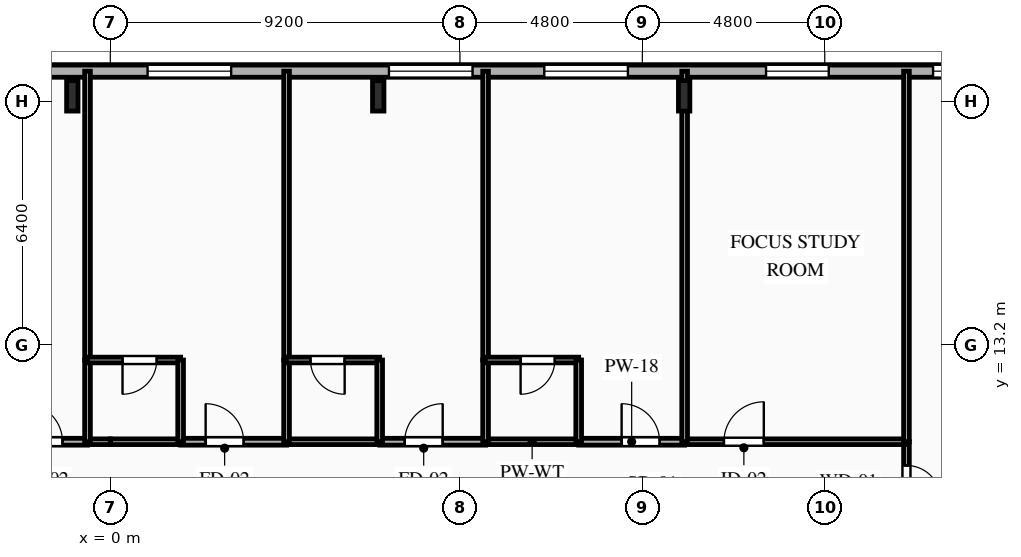
"""IFC4 building model, lengths in metres.
Left out: names, types, materials, properties, quantities, classifications, styles, units other than length and angle.
Written with IfcOpenShell. Run it as: python <this file> out.ifc"""

import sys

from ifc_helpers import new_model, si_unit, direction, frame, frame_2d, origin, origin_2d, place, context, subcontext, project, spatial, rectangle, i_section, extrude, element, fill, save


model = new_model("IFC4")
c1 = context("Model", 3, precision=1e-05, world=origin(), true_north=direction((0.0, 1.0)))
c2 = subcontext(c1, "Body", "Model", "MODEL_VIEW")
j1 = project(units=[si_unit("LENGTHUNIT", "METRE"), si_unit("PLANEANGLEUNIT", "RADIAN")], contexts=[c1])
p1 = place(None, origin())
s1 = spatial("IfcSite", under=j1, at=p1, CompositionType="ELEMENT")
p2 = place(p1, origin())
s2 = spatial("IfcBuilding", under=s1, at=p2, CompositionType="ELEMENT")
p3 = place(p2, frame((0.0, 0.0, 144.4)))
s3 = spatial("IfcBuildingStorey", under=s2, at=p3, CompositionType="ELEMENT", Elevation=144.4)
for number, where, z_axis, x_axis in (
    (1, (15.1, 19.75, 0.0), (0.0, 0.0, 1.0), (1.0, 0.0, 0.0)),
    (2, (7.05, 19.75, 0.0), (0.0, 0.0, 1.0), (1.0, 0.0, 0.0)),
    (3, (-1.0, 19.75, 0.0), (0.0, 0.0, 1.0), (1.0, 0.0, 0.0)),
):
    element("IfcColumn", number, at=place(p3, frame(where, z_axis=z_axis, x_axis=x_axis)), inside=s3, PredefinedType="COLUMN", context=c2, shape_type="SweptSolid", body=[
        extrude(i_section(OverallWidth=0.3, OverallDepth=0.8, WebThickness=0.018, FlangeThickness=0.033, FilletRadius=0.03, at=origin_2d()), origin(), (0.0, 0.0, 1.0), 3.35),
    ])
p4 = place(p3, frame((-25.8, 20.4, 0.0), z_axis=(0.0, 0.0, 1.0), x_axis=(1.0, 0.0, 0.0)))
e4 = element("IfcWall", 4, at=p4, inside=s3, PredefinedType="SOLIDWALL", context=c2, shape_type="SweptSolid", body=[
    extrude(rectangle(XDim=49.6, YDim=0.32, at=frame_2d((24.8, 0.0))), origin(), (0.0, 0.0, 1.0), 3.04),
])
p5 = place(p4, frame((2.135, 0.0, 0.85)))
e5 = element("IfcOpeningElement", 5, at=p5, cuts=e4, PredefinedType="OPENING", context=c2, shape_type="SweptSolid", body=[
    extrude(rectangle(XDim=1.65, YDim=1.85, at=frame_2d((0.825, 0.925))), frame((0.0, 0.17, 0.0), z_axis=(0.0, -1.0, 0.0), x_axis=(1.0, 0.0, 0.0)), (0.0, 0.0, 1.0), 0.34),
])
p6 = place(p4, frame((6.375, 0.0, 0.85)))
e6 = element("IfcOpeningElement", 6, at=p6, cuts=e4, PredefinedType="OPENING", context=c2, shape_type="SweptSolid", body=[
    extrude(rectangle(XDim=1.65, YDim=1.85, at=frame_2d((0.825, 0.925))), frame((0.0, 0.17, 0.0), z_axis=(0.0, -1.0, 0.0), x_axis=(1.0, 0.0, 0.0)), (0.0, 0.0, 1.0), 0.34),
])
p7 = place(p4, frame((12.53, 0.0, 0.85)))
e7 = element("IfcOpeningElement", 7, at=p7, cuts=e4, PredefinedType="OPENING", context=c2, shape_type="SweptSolid", body=[
    extrude(rectangle(XDim=1.5, YDim=1.85, at=frame_2d((0.75, 0.925))), frame((0.0, 0.17, 0.0), z_axis=(0.0, -1.0, 0.0), x_axis=(1.0, 0.0, 0.0)), (0.0, 0.0, 1.0), 0.34),
])
p8 = place(p4, frame((16.94, 0.0, 0.85)))
e8 = element("IfcOpeningElement", 8, at=p8, cuts=e4, PredefinedType="OPENING", context=c2, shape_type="SweptSolid", body=[
    extrude(rectangle(XDim=2.2, YDim=1.85, at=frame_2d((1.1, 0.925))), frame((0.0, 0.17, 0.0), z_axis=(0.0, -1.0, 0.0), x_axis=(1.0, 0.0, 0.0)), (0.0, 0.0, 1.0), 0.34),
])
p9 = place(p4, frame((21.54, 0.0, 0.85)))
e9 = element("IfcOpeningElement", 9, at=p9, cuts=e4, PredefinedType="OPENING", context=c2, shape_type="SweptSolid", body=[
    extrude(rectangle(XDim=2.2, YDim=1.85, at=frame_2d((1.1, 0.925))), frame((0.0, 0.17, 0.0), z_axis=(0.0, -1.0, 0.0), x_axis=(1.0, 0.0, 0.0)), (0.0, 0.0, 1.0), 0.34),
])
p10 = place(p4, frame((26.78, 0.0, 0.85)))
e10 = element("IfcOpeningElement", 10, at=p10, cuts=e4, PredefinedType="OPENING", context=c2, shape_type="SweptSolid", body=[
    extrude(rectangle(XDim=2.2, YDim=1.85, at=frame_2d((1.1, 0.925))), frame((0.0, 0.17, 0.0), z_axis=(0.0, -1.0, 0.0), x_axis=(1.0, 0.0, 0.0)), (0.0, 0.0, 1.0), 0.34),
])
p11 = place(p4, frame((33.132, 0.0, 0.85)))
e11 = element("IfcOpeningElement", 11, at=p11, cuts=e4, PredefinedType="OPENING", context=c2, shape_type="SweptSolid", body=[
    extrude(rectangle(XDim=2.2, YDim=1.85, at=frame_2d((1.1, 0.925))), frame((0.0, 0.17, 0.0), z_axis=(0.0, -1.0, 0.0), x_axis=(1.0, 0.0, 0.0)), (0.0, 0.0, 1.0), 0.34),
])
p12 = place(p4, frame((37.22, 0.0, 0.85)))
e12 = element("IfcOpeningElement", 12, at=p12, cuts=e4, PredefinedType="OPENING", context=c2, shape_type="SweptSolid", body=[
    extrude(rectangle(XDim=2.2, YDim=1.85, at=frame_2d((1.1, 0.925))), frame((0.0, 0.17, 0.0), z_axis=(0.0, -1.0, 0.0), x_axis=(1.0, 0.0, 0.0)), (0.0, 0.0, 1.0), 0.34),
])
p13 = place(p4, frame((43.055, 0.0, 0.85)))
e13 = element("IfcOpeningElement", 13, at=p13, cuts=e4, PredefinedType="OPENING", context=c2, shape_type="SweptSolid", body=[
    extrude(rectangle(XDim=1.65, YDim=1.85, at=frame_2d((0.825, 0.925))), frame((0.0, 0.17, 0.0), z_axis=(0.0, -1.0, 0.0), x_axis=(1.0, 0.0, 0.0)), (0.0, 0.0, 1.0), 0.34),
])
p14 = place(p4, frame((47.45, 0.0, 0.85)))
e14 = element("IfcOpeningElement", 14, at=p14, cuts=e4, PredefinedType="OPENING", context=c2, shape_type="SweptSolid", body=[
    extrude(rectangle(XDim=1.1, YDim=1.85, at=frame_2d((0.55, 0.925))), frame((0.0, 0.17, 0.0), z_axis=(0.0, -1.0, 0.0), x_axis=(1.0, 0.0, 0.0)), (0.0, 0.0, 1.0), 0.34),
])
p15 = place(p3, frame((-3.388, 10.65, 0.0), z_axis=(0.0, 0.0, 1.0), x_axis=(1.0, 0.0, 0.0)))
e15 = element("IfcWall", 15, at=p15, inside=s3, PredefinedType="PARTITIONING", context=c2, shape_type="SweptSolid", body=[
    extrude(rectangle(XDim=2.788, YDim=0.18, at=frame_2d((1.394, 0.0))), origin(), (0.0, 0.0, 1.0), 3.04),
])
p16 = place(p15, frame((1.129, 0.0, 0.0)))
e16 = element("IfcOpeningElement", 16, at=p16, cuts=e15, PredefinedType="OPENING", context=c2, shape_type="SweptSolid", body=[
    extrude(rectangle(XDim=1.0, YDim=2.15, at=frame_2d((0.5, 1.075))), frame((0.0, 0.1, 0.0), z_axis=(0.0, -1.0, 0.0), x_axis=(1.0, 0.0, 0.0)), (0.0, 0.0, 1.0), 0.2),
])
p17 = place(p3, frame((-0.6, 10.65, 0.0), z_axis=(0.0, 0.0, 1.0), x_axis=(1.0, 0.0, 0.0)))
e17 = element("IfcWall", 17, at=p17, inside=s3, PredefinedType="PLUMBINGWALL", context=c2, shape_type="SweptSolid", body=[
    extrude(rectangle(XDim=0.6, YDim=0.15, at=frame_2d((0.3, 0.0))), origin(), (0.0, 0.0, 1.0), 3.04),
])
p18 = place(p3, frame((20.95, 10.65, 0.0), z_axis=(0.0, 0.0, 1.0), x_axis=(0.0, -1.0, 0.0)))
e18 = element("IfcWall", 18, at=p18, inside=s3, PredefinedType="PARTITIONING", context=c2, shape_type="SweptSolid", body=[
    extrude(rectangle(XDim=2.15, YDim=0.15, at=frame_2d((1.075, 0.0))), origin(), (0.0, 0.0, 1.0), 3.04),
])
p19 = place(p18, frame((0.625, 0.0, 0.0)))
e19 = element("IfcOpeningElement", 19, at=p19, cuts=e18, PredefinedType="OPENING", context=c2, shape_type="SweptSolid", body=[
    extrude(rectangle(XDim=0.9, YDim=2.1, at=frame_2d((0.45, 1.05))), frame((0.0, 0.085, 0.0), z_axis=(0.0, -1.0, 0.0), x_axis=(1.0, 0.0, 0.0)), (0.0, 0.0, 1.0), 0.17),
])
p20 = place(p3, frame((1.85, 10.65, 0.0), z_axis=(0.0, 0.0, 1.0), x_axis=(1.0, 0.0, 0.0)))
e20 = element("IfcWall", 20, at=p20, inside=s3, PredefinedType="PARTITIONING", context=c2, shape_type="SweptSolid", body=[
    extrude(rectangle(XDim=2.788, YDim=0.18, at=frame_2d((1.394, 0.0))), origin(), (0.0, 0.0, 1.0), 3.04),
])
p21 = place(p20, frame((0.658, 0.0, 0.0)))
e21 = element("IfcOpeningElement", 21, at=p21, cuts=e20, PredefinedType="OPENING", context=c2, shape_type="SweptSolid", body=[
    extrude(rectangle(XDim=1.0, YDim=2.15, at=frame_2d((0.5, 1.075))), frame((0.0, 0.1, 0.0), z_axis=(0.0, -1.0, 0.0), x_axis=(1.0, 0.0, 0.0)), (0.0, 0.0, 1.0), 0.2),
])
p22 = place(p3, frame((0.0, 10.65, 0.0), z_axis=(0.0, 0.0, 1.0), x_axis=(1.0, 0.0, 0.0)))
e22 = element("IfcWall", 22, at=p22, inside=s3, PredefinedType="PLUMBINGWALL", context=c2, shape_type="SweptSolid", body=[
    extrude(rectangle(XDim=1.85, YDim=0.15, at=frame_2d((0.925, 0.0))), origin(), (0.0, 0.0, 1.0), 3.04),
])
p23 = place(p3, frame((7.088, 10.65, 0.0), z_axis=(0.0, 0.0, 1.0), x_axis=(1.0, 0.0, 0.0)))
e23 = element("IfcWall", 23, at=p23, inside=s3, PredefinedType="PARTITIONING", context=c2, shape_type="SweptSolid", body=[
    extrude(rectangle(XDim=2.787, YDim=0.18, at=frame_2d((1.394, 0.0))), origin(), (0.0, 0.0, 1.0), 3.04),
])
p24 = place(p23, frame((0.658, 0.0, 0.0)))
e24 = element("IfcOpeningElement", 24, at=p24, cuts=e23, PredefinedType="OPENING", context=c2, shape_type="SweptSolid", body=[
    extrude(rectangle(XDim=1.0, YDim=2.15, at=frame_2d((0.5, 1.075))), frame((0.0, 0.1, 0.0), z_axis=(0.0, -1.0, 0.0), x_axis=(1.0, 0.0, 0.0)), (0.0, 0.0, 1.0), 0.2),
])
p25 = place(p3, frame((4.638, 10.65, 0.0), z_axis=(0.0, 0.0, 1.0), x_axis=(1.0, 0.0, 0.0)))
e25 = element("IfcWall", 25, at=p25, inside=s3, PredefinedType="PLUMBINGWALL", context=c2, shape_type="SweptSolid", body=[
    extrude(rectangle(XDim=2.45, YDim=0.15, at=frame_2d((1.225, 0.0))), origin(), (0.0, 0.0, 1.0), 3.04),
])
p26 = place(p3, frame((12.325, 10.65, 0.0), z_axis=(0.0, 0.0, 1.0), x_axis=(1.0, 0.0, 0.0)))
e26 = element("IfcWall", 26, at=p26, inside=s3, PredefinedType="PARTITIONING", context=c2, shape_type="SweptSolid", body=[
    extrude(rectangle(XDim=2.788, YDim=0.18, at=frame_2d((1.394, 0.0))), origin(), (0.0, 0.0, 1.0), 3.04),
])
p27 = place(p26, frame((1.129, 0.0, 0.0)))
e27 = element("IfcOpeningElement", 27, at=p27, cuts=e26, PredefinedType="OPENING", context=c2, shape_type="SweptSolid", body=[
    extrude(rectangle(XDim=1.0, YDim=2.15, at=frame_2d((0.5, 1.075))), frame((0.0, 0.1, 0.0), z_axis=(0.0, -1.0, 0.0), x_axis=(1.0, 0.0, 0.0)), (0.0, 0.0, 1.0), 0.2),
])
p28 = place(p3, frame((9.875, 10.65, 0.0), z_axis=(0.0, 0.0, 1.0), x_axis=(1.0, 0.0, 0.0)))
e28 = element("IfcWall", 28, at=p28, inside=s3, PredefinedType="PLUMBINGWALL", context=c2, shape_type="SweptSolid", body=[
    extrude(rectangle(XDim=2.45, YDim=0.15, at=frame_2d((1.225, 0.0))), origin(), (0.0, 0.0, 1.0), 3.04),
])
p29 = place(p3, frame((15.113, 10.65, 0.0), z_axis=(0.0, 0.0, 1.0), x_axis=(1.0, 0.0, 0.0)))
e29 = element("IfcWall", 29, at=p29, inside=s3, PredefinedType="PARTITIONING", context=c2, shape_type="SweptSolid", body=[
    extrude(rectangle(XDim=5.837, YDim=0.15, at=frame_2d((2.918, 0.0))), origin(), (0.0, 0.0, 1.0), 3.04),
])
p30 = place(p29, frame((1.033, 0.0, 0.0)))
e30 = element("IfcOpeningElement", 30, at=p30, cuts=e29, PredefinedType="OPENING", context=c2, shape_type="SweptSolid", body=[
    extrude(rectangle(XDim=1.05, YDim=2.15, at=frame_2d((0.525, 1.075))), frame((0.0, 0.085, 0.0), z_axis=(0.0, -1.0, 0.0), x_axis=(1.0, 0.0, 0.0)), (0.0, 0.0, 1.0), 0.17),
])
p31 = place(p3, frame((20.95, 10.65, 0.0), z_axis=(0.0, 0.0, 1.0), x_axis=(0.0, 1.0, 0.0)))
e31 = element("IfcWall", 31, at=p31, inside=s3, PredefinedType="PARTITIONING", context=c2, shape_type="SweptSolid", body=[
    extrude(rectangle(XDim=9.75, YDim=0.15, at=frame_2d((4.875, 0.0))), origin(), (0.0, 0.0, 1.0), 2.525),
])
p32 = place(p3, frame((-0.6, 20.4, 0.0), z_axis=(0.0, 0.0, 1.0), x_axis=(0.0, -1.0, 0.0)))
e32 = element("IfcWall", 32, at=p32, inside=s3, PredefinedType="PARTITIONING", context=c2, shape_type="SweptSolid", body=[
    extrude(rectangle(XDim=7.6, YDim=0.15, at=frame_2d((3.8, 0.0))), origin(), (0.0, 0.0, 1.0), 3.04),
])
p33 = place(p3, frame((-0.6, 12.8, 0.0), z_axis=(0.0, 0.0, 1.0), x_axis=(0.0, -1.0, 0.0)))
e33 = element("IfcWall", 33, at=p33, inside=s3, PredefinedType="PLUMBINGWALL", context=c2, shape_type="SweptSolid", body=[
    extrude(rectangle(XDim=2.15, YDim=0.15, at=frame_2d((1.075, 0.0))), origin(), (0.0, 0.0, 1.0), 3.04),
])
p34 = place(p3, frame((1.85, 12.8, 0.0), z_axis=(0.0, 0.0, 1.0), x_axis=(-1.0, 0.0, 0.0)))
e34 = element("IfcWall", 34, at=p34, inside=s3, PredefinedType="PLUMBINGWALL", context=c2, shape_type="SweptSolid", body=[
    extrude(rectangle(XDim=2.45, YDim=0.15, at=frame_2d((1.225, 0.0))), origin(), (0.0, 0.0, 1.0), 3.04),
])
p35 = place(p34, frame((0.629, 0.0, 0.0)))
e35 = element("IfcOpeningElement", 35, at=p35, cuts=e34, PredefinedType="OPENING", context=c2, shape_type="SweptSolid", body=[
    extrude(rectangle(XDim=0.9, YDim=2.1, at=frame_2d((0.45, 1.05))), frame((0.0, 0.085, 0.0), z_axis=(0.0, -1.0, 0.0), x_axis=(1.0, 0.0, 0.0)), (0.0, 0.0, 1.0), 0.17),
])
p36 = place(p3, frame((1.85, 10.65, 0.0), z_axis=(0.0, 0.0, 1.0), x_axis=(0.0, 1.0, 0.0)))
e36 = element("IfcWall", 36, at=p36, inside=s3, PredefinedType="PLUMBINGWALL", context=c2, shape_type="SweptSolid", body=[
    extrude(rectangle(XDim=2.15, YDim=0.15, at=frame_2d((1.075, 0.0))), origin(), (0.0, 0.0, 1.0), 3.04),
])
p37 = place(p3, frame((4.638, 20.4, 0.0), z_axis=(0.0, 0.0, 1.0), x_axis=(0.0, -1.0, 0.0)))
e37 = element("IfcWall", 37, at=p37, inside=s3, PredefinedType="PARTITIONING", context=c2, shape_type="SweptSolid", body=[
    extrude(rectangle(XDim=7.6, YDim=0.15, at=frame_2d((3.8, 0.0))), origin(), (0.0, 0.0, 1.0), 3.04),
])
p38 = place(p3, frame((4.638, 12.8, 0.0), z_axis=(0.0, 0.0, 1.0), x_axis=(0.0, -1.0, 0.0)))
e38 = element("IfcWall", 38, at=p38, inside=s3, PredefinedType="PLUMBINGWALL", context=c2, shape_type="SweptSolid", body=[
    extrude(rectangle(XDim=2.15, YDim=0.15, at=frame_2d((1.075, 0.0))), origin(), (0.0, 0.0, 1.0), 3.04),
])
p39 = place(p3, frame((7.088, 12.8, 0.0), z_axis=(0.0, 0.0, 1.0), x_axis=(-1.0, 0.0, 0.0)))
e39 = element("IfcWall", 39, at=p39, inside=s3, PredefinedType="PLUMBINGWALL", context=c2, shape_type="SweptSolid", body=[
    extrude(rectangle(XDim=2.45, YDim=0.15, at=frame_2d((1.225, 0.0))), origin(), (0.0, 0.0, 1.0), 3.04),
])
p40 = place(p39, frame((0.921, 0.0, 0.0)))
e40 = element("IfcOpeningElement", 40, at=p40, cuts=e39, PredefinedType="OPENING", context=c2, shape_type="SweptSolid", body=[
    extrude(rectangle(XDim=0.9, YDim=2.1, at=frame_2d((0.45, 1.05))), frame((0.0, 0.085, 0.0), z_axis=(0.0, -1.0, 0.0), x_axis=(1.0, 0.0, 0.0)), (0.0, 0.0, 1.0), 0.17),
])
p41 = place(p3, frame((7.088, 10.65, 0.0), z_axis=(0.0, 0.0, 1.0), x_axis=(0.0, 1.0, 0.0)))
e41 = element("IfcWall", 41, at=p41, inside=s3, PredefinedType="PLUMBINGWALL", context=c2, shape_type="SweptSolid", body=[
    extrude(rectangle(XDim=2.15, YDim=0.15, at=frame_2d((1.075, 0.0))), origin(), (0.0, 0.0, 1.0), 3.04),
])
p42 = place(p3, frame((9.875, 20.4, 0.0), z_axis=(0.0, 0.0, 1.0), x_axis=(0.0, -1.0, 0.0)))
e42 = element("IfcWall", 42, at=p42, inside=s3, PredefinedType="PARTITIONING", context=c2, shape_type="SweptSolid", body=[
    extrude(rectangle(XDim=7.6, YDim=0.15, at=frame_2d((3.8, 0.0))), origin(), (0.0, 0.0, 1.0), 3.04),
])
p43 = place(p3, frame((9.875, 12.8, 0.0), z_axis=(0.0, 0.0, 1.0), x_axis=(0.0, -1.0, 0.0)))
e43 = element("IfcWall", 43, at=p43, inside=s3, PredefinedType="PLUMBINGWALL", context=c2, shape_type="SweptSolid", body=[
    extrude(rectangle(XDim=2.15, YDim=0.15, at=frame_2d((1.075, 0.0))), origin(), (0.0, 0.0, 1.0), 3.04),
])
p44 = place(p3, frame((12.325, 12.8, 0.0), z_axis=(0.0, 0.0, 1.0), x_axis=(-1.0, 0.0, 0.0)))
e44 = element("IfcWall", 44, at=p44, inside=s3, PredefinedType="PLUMBINGWALL", context=c2, shape_type="SweptSolid", body=[
    extrude(rectangle(XDim=2.45, YDim=0.15, at=frame_2d((1.225, 0.0))), origin(), (0.0, 0.0, 1.0), 3.04),
])
p45 = place(p44, frame((0.629, 0.0, 0.0)))
e45 = element("IfcOpeningElement", 45, at=p45, cuts=e44, PredefinedType="OPENING", context=c2, shape_type="SweptSolid", body=[
    extrude(rectangle(XDim=0.9, YDim=2.1, at=frame_2d((0.45, 1.05))), frame((0.0, 0.085, 0.0), z_axis=(0.0, -1.0, 0.0), x_axis=(1.0, 0.0, 0.0)), (0.0, 0.0, 1.0), 0.17),
])
p46 = place(p3, frame((12.325, 10.65, 0.0), z_axis=(0.0, 0.0, 1.0), x_axis=(0.0, 1.0, 0.0)))
e46 = element("IfcWall", 46, at=p46, inside=s3, PredefinedType="PLUMBINGWALL", context=c2, shape_type="SweptSolid", body=[
    extrude(rectangle(XDim=2.15, YDim=0.15, at=frame_2d((1.075, 0.0))), origin(), (0.0, 0.0, 1.0), 3.04),
])
p47 = place(p3, frame((15.113, 20.4, 0.0), z_axis=(0.0, 0.0, 1.0), x_axis=(0.0, -1.0, 0.0)))
e47 = element("IfcWall", 47, at=p47, inside=s3, PredefinedType="PARTITIONING", context=c2, shape_type="SweptSolid", body=[
    extrude(rectangle(XDim=9.75, YDim=0.15, at=frame_2d((4.875, 0.0))), origin(), (0.0, 0.0, 1.0), 2.525),
])
p48 = place(p10, origin())
e48 = element("IfcWindow", 48, at=p48, inside=s3, PartitioningType="SINGLE_PANEL", PredefinedType="WINDOW", context=c2, shape_type="SweptSolid", body=[
    extrude(rectangle(XDim=2.2, YDim=1.85, at=frame_2d((1.1, 0.925))), frame((0.0, 0.03, 0.0), z_axis=(0.0, -1.0, 0.0), x_axis=(1.0, 0.0, 0.0)), (0.0, 0.0, 1.0), 0.06),
])
fill(e10, e48)
p49 = place(p11, origin())
e49 = element("IfcWindow", 49, at=p49, inside=s3, PartitioningType="SINGLE_PANEL", PredefinedType="WINDOW", context=c2, shape_type="SweptSolid", body=[
    extrude(rectangle(XDim=2.2, YDim=1.85, at=frame_2d((1.1, 0.925))), frame((0.0, 0.03, 0.0), z_axis=(0.0, -1.0, 0.0), x_axis=(1.0, 0.0, 0.0)), (0.0, 0.0, 1.0), 0.06),
])
fill(e11, e49)
p50 = place(p12, origin())
e50 = element("IfcWindow", 50, at=p50, inside=s3, PartitioningType="SINGLE_PANEL", PredefinedType="WINDOW", context=c2, shape_type="SweptSolid", body=[
    extrude(rectangle(XDim=2.2, YDim=1.85, at=frame_2d((1.1, 0.925))), frame((0.0, 0.03, 0.0), z_axis=(0.0, -1.0, 0.0), x_axis=(1.0, 0.0, 0.0)), (0.0, 0.0, 1.0), 0.06),
])
fill(e12, e50)
p51 = place(p13, origin())
e51 = element("IfcWindow", 51, at=p51, inside=s3, PartitioningType="SINGLE_PANEL", PredefinedType="WINDOW", context=c2, shape_type="SweptSolid", body=[
    extrude(rectangle(XDim=1.65, YDim=1.85, at=frame_2d((0.825, 0.925))), frame((0.0, 0.03, 0.0), z_axis=(0.0, -1.0, 0.0), x_axis=(1.0, 0.0, 0.0)), (0.0, 0.0, 1.0), 0.06),
])
fill(e13, e51)
p52 = place(p14, origin())
e52 = element("IfcWindow", 52, at=p52, inside=s3, PartitioningType="SINGLE_PANEL", PredefinedType="WINDOW", context=c2, shape_type="SweptSolid", body=[
    extrude(rectangle(XDim=1.1, YDim=1.85, at=frame_2d((0.55, 0.925))), frame((0.0, 0.03, 0.0), z_axis=(0.0, -1.0, 0.0), x_axis=(1.0, 0.0, 0.0)), (0.0, 0.0, 1.0), 0.06),
])
fill(e14, e52)
p53 = place(p16, origin())
e53 = element("IfcDoor", 53, at=p53, inside=s3, OperationType="SINGLE_SWING_LEFT", PredefinedType="DOOR", context=c2, shape_type="SweptSolid", body=[
    extrude(rectangle(XDim=1.0, YDim=2.15, at=frame_2d((0.5, 1.075))), frame((0.0, 0.025, 0.0), z_axis=(0.0, -1.0, 0.0), x_axis=(1.0, 0.0, 0.0)), (0.0, 0.0, 1.0), 0.05),
])
fill(e16, e53)
p54 = place(p19, origin())
e54 = element("IfcDoor", 54, at=p54, inside=s3, OperationType="SINGLE_SWING_RIGHT", PredefinedType="DOOR", context=c2, shape_type="SweptSolid", body=[
    extrude(rectangle(XDim=0.9, YDim=2.1, at=frame_2d((0.45, 1.05))), frame((0.0, 0.025, 0.0), z_axis=(0.0, -1.0, 0.0), x_axis=(1.0, 0.0, 0.0)), (0.0, 0.0, 1.0), 0.05),
])
fill(e19, e54)
p55 = place(p21, origin())
e55 = element("IfcDoor", 55, at=p55, inside=s3, OperationType="SINGLE_SWING_LEFT", PredefinedType="DOOR", context=c2, shape_type="SweptSolid", body=[
    extrude(rectangle(XDim=1.0, YDim=2.15, at=frame_2d((0.5, 1.075))), frame((0.0, 0.025, 0.0), z_axis=(0.0, -1.0, 0.0), x_axis=(1.0, 0.0, 0.0)), (0.0, 0.0, 1.0), 0.05),
])
fill(e21, e55)
p56 = place(p24, origin())
e56 = element("IfcDoor", 56, at=p56, inside=s3, OperationType="SINGLE_SWING_RIGHT", PredefinedType="DOOR", context=c2, shape_type="SweptSolid", body=[
    extrude(rectangle(XDim=1.0, YDim=2.15, at=frame_2d((0.5, 1.075))), frame((0.0, 0.025, 0.0), z_axis=(0.0, -1.0, 0.0), x_axis=(1.0, 0.0, 0.0)), (0.0, 0.0, 1.0), 0.05),
])
fill(e24, e56)
p57 = place(p27, origin())
e57 = element("IfcDoor", 57, at=p57, inside=s3, OperationType="SINGLE_SWING_LEFT", PredefinedType="DOOR", context=c2, shape_type="SweptSolid", body=[
    extrude(rectangle(XDim=1.0, YDim=2.15, at=frame_2d((0.5, 1.075))), frame((0.0, 0.025, 0.0), z_axis=(0.0, -1.0, 0.0), x_axis=(1.0, 0.0, 0.0)), (0.0, 0.0, 1.0), 0.05),
])
fill(e27, e57)
p58 = place(p30, origin())
e58 = element("IfcDoor", 58, at=p58, inside=s3, OperationType="SINGLE_SWING_RIGHT", PredefinedType="DOOR", context=c2, shape_type="SweptSolid", body=[
    extrude(rectangle(XDim=1.05, YDim=2.15, at=frame_2d((0.525, 1.075))), frame((0.0, 0.025, 0.0), z_axis=(0.0, -1.0, 0.0), x_axis=(1.0, 0.0, 0.0)), (0.0, 0.0, 1.0), 0.05),
])
fill(e30, e58)
p59 = place(p35, origin())
e59 = element("IfcDoor", 59, at=p59, inside=s3, OperationType="SINGLE_SWING_RIGHT", PredefinedType="DOOR", context=c2, shape_type="SweptSolid", body=[
    extrude(rectangle(XDim=0.9, YDim=2.1, at=frame_2d((0.45, 1.05))), frame((0.0, 0.025, 0.0), z_axis=(0.0, -1.0, 0.0), x_axis=(1.0, 0.0, 0.0)), (0.0, 0.0, 1.0), 0.05),
])
fill(e35, e59)
p60 = place(p40, origin())
e60 = element("IfcDoor", 60, at=p60, inside=s3, OperationType="SINGLE_SWING_LEFT", PredefinedType="DOOR", context=c2, shape_type="SweptSolid", body=[
    extrude(rectangle(XDim=0.9, YDim=2.1, at=frame_2d((0.45, 1.05))), frame((0.0, 0.025, 0.0), z_axis=(0.0, -1.0, 0.0), x_axis=(1.0, 0.0, 0.0)), (0.0, 0.0, 1.0), 0.05),
])
fill(e40, e60)
p61 = place(p45, origin())
e61 = element("IfcDoor", 61, at=p61, inside=s3, OperationType="SINGLE_SWING_RIGHT", PredefinedType="DOOR", context=c2, shape_type="SweptSolid", body=[
    extrude(rectangle(XDim=0.9, YDim=2.1, at=frame_2d((0.45, 1.05))), frame((0.0, 0.025, 0.0), z_axis=(0.0, -1.0, 0.0), x_axis=(1.0, 0.0, 0.0)), (0.0, 0.0, 1.0), 0.05),
])
fill(e45, e61)
save(model, sys.argv[1])
